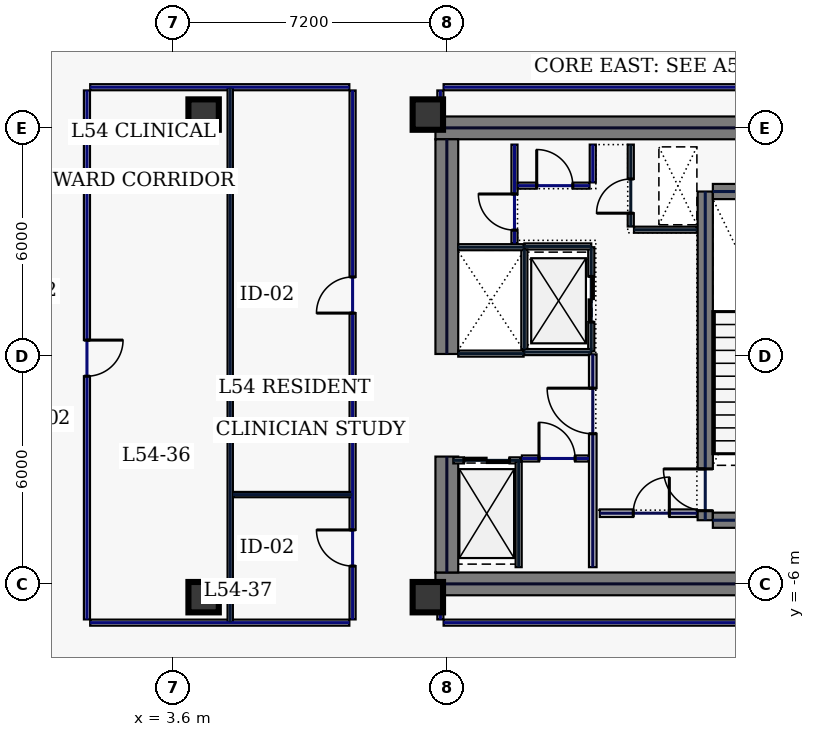
"""IFC4 building model, lengths in metres.
Left out: names, types, materials, properties, quantities, classifications, styles, units other than length and angle.
Written with IfcOpenShell. Run it as: python <this file> out.ifc"""

import sys

from ifc_helpers import new_model, si_unit, direction, frame, frame_2d, origin, origin_2d, place, context, subcontext, project, spatial, rectangle, hollow_rectangle, extrude, element, fill, save


model = new_model("IFC4")
c1 = context("Model", 3, precision=1e-05, world=origin(), true_north=direction((0.0, 1.0)))
c2 = subcontext(c1, "Body", "Model", "MODEL_VIEW")
j1 = project(units=[si_unit("LENGTHUNIT", "METRE"), si_unit("PLANEANGLEUNIT", "RADIAN")], contexts=[c1])
p1 = place(None, origin())
s1 = spatial("IfcSite", under=j1, at=p1, CompositionType="ELEMENT")
p2 = place(p1, origin())
s2 = spatial("IfcBuilding", under=s1, at=p2, CompositionType="ELEMENT")
p3 = place(p2, frame((0.0, 0.0, 234.2)))
s3 = spatial("IfcBuildingStorey", under=s2, at=p3, CompositionType="ELEMENT", Elevation=234.2)
for number, where, z_axis, x_axis in (
    (1, (10.5, 6.0, 0.0), (0.0, 0.0, 1.0), (1.0, 0.0, 0.0)),
    (2, (10.5, -6.0, 0.0), (0.0, 0.0, 1.0), (1.0, 0.0, 0.0)),
):
    element("IfcWall", number, at=place(p3, frame(where, z_axis=z_axis, x_axis=x_axis)), inside=s3, PredefinedType="SHEAR", context=c2, shape_type="SweptSolid", body=[
        extrude(rectangle(XDim=11.5, YDim=0.6, at=frame_2d((5.75, 0.0))), origin(), (0.0, 0.0, 1.0), 3.74),
    ])
p4 = place(p3, frame((10.8, -5.7, 0.0), z_axis=(0.0, 0.0, 1.0), x_axis=(0.0, 1.0, 0.0)))
e3 = element("IfcWall", 3, at=p4, inside=s3, PredefinedType="SHEAR", context=c2, shape_type="SweptSolid", body=[
    extrude(rectangle(XDim=3.05, YDim=0.6, at=frame_2d((1.525, 0.0))), origin(), (0.0, 0.0, 1.0), 3.74),
])
p5 = place(p3, frame((10.8, 0.05, 0.0), z_axis=(0.0, 0.0, 1.0), x_axis=(0.0, 1.0, 0.0)))
e4 = element("IfcWall", 4, at=p5, inside=s3, PredefinedType="SHEAR", context=c2, shape_type="SweptSolid", body=[
    extrude(rectangle(XDim=5.65, YDim=0.6, at=frame_2d((2.825, 0.0))), origin(), (0.0, 0.0, 1.0), 3.74),
])
p6 = place(p3, frame((17.6, -4.325, 0.0), z_axis=(0.0, 0.0, 1.0), x_axis=(0.0, 1.0, 0.0)))
e5 = element("IfcWall", 5, at=p6, inside=s3, PredefinedType="SHEAR", context=c2, shape_type="SweptSolid", body=[
    extrude(rectangle(XDim=8.65, YDim=0.4, at=frame_2d((4.325, 0.0))), origin(), (0.0, 0.0, 1.0), 3.74),
])
p7 = place(p6, frame((0.25, 0.0, 0.0)))
e6 = element("IfcOpeningElement", 6, at=p7, cuts=e5, PredefinedType="OPENING", context=c2, shape_type="SweptSolid", body=[
    extrude(rectangle(XDim=1.1, YDim=2.2, at=frame_2d((0.55, 1.1))), frame((0.0, 0.21, 0.0), z_axis=(0.0, -1.0, 0.0), x_axis=(1.0, 0.0, 0.0)), (0.0, 0.0, 1.0), 0.42),
])
for number, where, z_axis, x_axis in (
    (7, (17.8, -4.325, 0.0), (0.0, 0.0, 1.0), (1.0, 0.0, 0.0)),
    (8, (17.8, 4.325, 0.0), (0.0, 0.0, 1.0), (1.0, 0.0, 0.0)),
):
    element("IfcWall", number, at=place(p3, frame(where, z_axis=z_axis, x_axis=x_axis)), inside=s3, PredefinedType="SHEAR", context=c2, shape_type="SweptSolid", body=[
        extrude(rectangle(XDim=3.4, YDim=0.4, at=frame_2d((1.7, 0.0))), origin(), (0.0, 0.0, 1.0), 3.74),
    ])
for number, where, z_axis, x_axis in (
    (9, (10.3, -6.35, 0.0), (0.0, 0.0, 1.0), (1.0, 0.0, 0.0)),
    (10, (10.3, 6.35, 0.0), (0.0, 0.0, 1.0), (1.0, 0.0, 0.0)),
    (11, (4.4, -6.35, 0.0), (0.0, 0.0, 1.0), (1.0, 0.0, 0.0)),
    (12, (4.4, 6.35, 0.0), (0.0, 0.0, 1.0), (1.0, 0.0, 0.0)),
):
    element("IfcColumn", number, at=place(p3, frame(where, z_axis=z_axis, x_axis=x_axis)), inside=s3, PredefinedType="COLUMN", context=c2, shape_type="SweptSolid", body=[
        extrude(hollow_rectangle(XDim=0.8, YDim=0.8, WallThickness=0.036, at=origin_2d()), origin(), (0.0, 0.0, 1.0), 3.74),
    ])
p8 = place(p3, frame((14.6, 0.12, 0.0), z_axis=(0.0, 0.0, 1.0), x_axis=(0.0, 1.0, 0.0)))
e13 = element("IfcWall", 13, at=p8, inside=s3, PredefinedType="PARTITIONING", context=c2, shape_type="SweptSolid", body=[
    extrude(rectangle(XDim=2.74, YDim=0.16, at=frame_2d((1.37, 0.0))), origin(), (0.0, 0.0, 1.0), 3.74),
])
p9 = place(p8, frame((0.77, 0.0, 0.0)))
e14 = element("IfcOpeningElement", 14, at=p9, cuts=e13, PredefinedType="OPENING", context=c2, shape_type="SweptSolid", body=[
    extrude(rectangle(XDim=1.2, YDim=2.2, at=frame_2d((0.6, 1.1))), frame((0.0, 0.09, 0.0), z_axis=(0.0, -1.0, 0.0), x_axis=(1.0, 0.0, 0.0)), (0.0, 0.0, 1.0), 0.18),
])
for number, where, z_axis, x_axis in (
    (15, (12.84, 0.1, 0.0), (0.0, 0.0, 1.0), (1.0, 0.0, 0.0)),
    (16, (12.84, 2.88, 0.0), (0.0, 0.0, 1.0), (1.0, 0.0, 0.0)),
):
    element("IfcWall", number, at=place(p3, frame(where, z_axis=z_axis, x_axis=x_axis)), inside=s3, PredefinedType="PARTITIONING", context=c2, shape_type="SweptSolid", body=[
        extrude(rectangle(XDim=1.76, YDim=0.16, at=frame_2d((0.88, 0.0))), origin(), (0.0, 0.0, 1.0), 3.74),
    ])
p10 = place(p3, frame((12.84, 0.18, 0.0), z_axis=(0.0, 0.0, 1.0), x_axis=(0.0, 1.0, 0.0)))
e17 = element("IfcWall", 17, at=p10, inside=s3, PredefinedType="PARTITIONING", context=c2, shape_type="SweptSolid", body=[
    extrude(rectangle(XDim=2.62, YDim=0.16, at=frame_2d((1.31, 0.0))), origin(), (0.0, 0.0, 1.0), 3.74),
])
p11 = place(p3, frame((10.97, -2.75, 0.0), z_axis=(0.0, 0.0, 1.0), x_axis=(1.0, 0.0, 0.0)))
e18 = element("IfcWall", 18, at=p11, inside=s3, PredefinedType="PARTITIONING", context=c2, shape_type="SweptSolid", body=[
    extrude(rectangle(XDim=1.76, YDim=0.16, at=frame_2d((0.88, 0.0))), origin(), (0.0, 0.0, 1.0), 3.74),
])
p12 = place(p11, frame((0.28, 0.0, 0.0)))
e19 = element("IfcOpeningElement", 19, at=p12, cuts=e18, PredefinedType="OPENING", context=c2, shape_type="SweptSolid", body=[
    extrude(rectangle(XDim=1.2, YDim=2.2, at=frame_2d((0.6, 1.1))), frame((0.0, 0.09, 0.0), z_axis=(0.0, -1.0, 0.0), x_axis=(1.0, 0.0, 0.0)), (0.0, 0.0, 1.0), 0.18),
])
for number, where, z_axis, x_axis in (
    (20, (11.1, 0.06, 0.0), (0.0, 0.0, 1.0), (1.0, 0.0, 0.0)),
    (21, (11.1, 2.86, 0.0), (0.0, 0.0, 1.0), (1.0, 0.0, 0.0)),
):
    element("IfcWall", number, at=place(p3, frame(where, z_axis=z_axis, x_axis=x_axis)), inside=s3, PredefinedType="PARTITIONING", context=c2, shape_type="SweptSolid", body=[
        extrude(rectangle(XDim=1.72, YDim=0.16, at=frame_2d((0.86, 0.0))), origin(), (0.0, 0.0, 1.0), 3.74),
    ])
p13 = place(p3, frame((15.64, 3.405, 0.0), z_axis=(0.0, 0.0, 1.0), x_axis=(0.0, 1.0, 0.0)))
e22 = element("IfcWall", 22, at=p13, inside=s3, PredefinedType="PARTITIONING", context=c2, shape_type="SweptSolid", body=[
    extrude(rectangle(XDim=2.155, YDim=0.16, at=frame_2d((1.078, 0.0))), origin(), (0.0, 0.0, 1.0), 3.74),
])
p14 = place(p13, frame((0.35, 0.0, 0.0)))
e23 = element("IfcOpeningElement", 23, at=p14, cuts=e22, PredefinedType="OPENING", context=c2, shape_type="SweptSolid", body=[
    extrude(rectangle(XDim=0.9, YDim=2.2, at=frame_2d((0.45, 1.1))), frame((0.0, 0.09, 0.0), z_axis=(0.0, -1.0, 0.0), x_axis=(1.0, 0.0, 0.0)), (0.0, 0.0, 1.0), 0.18),
])
p15 = place(p3, frame((15.725, 3.32, 0.0), z_axis=(0.0, 0.0, 1.0), x_axis=(1.0, 0.0, 0.0)))
e24 = element("IfcWall", 24, at=p15, inside=s3, PredefinedType="PARTITIONING", context=c2, shape_type="SweptSolid", body=[
    extrude(rectangle(XDim=1.655, YDim=0.16, at=frame_2d((0.827, 0.0))), origin(), (0.0, 0.0, 1.0), 3.74),
])
p16 = place(p3, frame((14.825, -4.14, 0.0), z_axis=(0.0, 0.0, 1.0), x_axis=(1.0, 0.0, 0.0)))
e25 = element("IfcWall", 25, at=p16, inside=s3, PredefinedType="SOLIDWALL", context=c2, shape_type="SweptSolid", body=[
    extrude(rectangle(XDim=2.555, YDim=0.2, at=frame_2d((1.277, 0.0))), origin(), (0.0, 0.0, 1.0), 3.74),
])
p17 = place(p16, frame((0.88, 0.0, 0.0)))
e26 = element("IfcOpeningElement", 26, at=p17, cuts=e25, PredefinedType="OPENING", context=c2, shape_type="SweptSolid", body=[
    extrude(rectangle(XDim=0.95, YDim=2.2, at=frame_2d((0.475, 1.1))), frame((0.0, 0.11, 0.0), z_axis=(0.0, -1.0, 0.0), x_axis=(1.0, 0.0, 0.0)), (0.0, 0.0, 1.0), 0.22),
])
p18 = place(p3, frame((12.775, -2.7, 0.0), z_axis=(0.0, 0.0, 1.0), x_axis=(1.0, 0.0, 0.0)))
e27 = element("IfcWall", 27, at=p18, inside=s3, PredefinedType="PARTITIONING", context=c2, shape_type="SweptSolid", body=[
    extrude(rectangle(XDim=1.76, YDim=0.16, at=frame_2d((0.88, 0.0))), origin(), (0.0, 0.0, 1.0), 3.74),
])
p19 = place(p18, frame((0.45, 0.0, 0.0)))
e28 = element("IfcOpeningElement", 28, at=p19, cuts=e27, PredefinedType="OPENING", context=c2, shape_type="SweptSolid", body=[
    extrude(rectangle(XDim=0.95, YDim=2.2, at=frame_2d((0.475, 1.1))), frame((0.0, 0.09, 0.0), z_axis=(0.0, -1.0, 0.0), x_axis=(1.0, 0.0, 0.0)), (0.0, 0.0, 1.0), 0.18),
])
p20 = place(p3, frame((12.69, -5.56, 0.0), z_axis=(0.0, 0.0, 1.0), x_axis=(0.0, 1.0, 0.0)))
e29 = element("IfcWall", 29, at=p20, inside=s3, PredefinedType="PARTITIONING", context=c2, shape_type="SweptSolid", body=[
    extrude(rectangle(XDim=2.775, YDim=0.16, at=frame_2d((1.388, 0.0))), origin(), (0.0, 0.0, 1.0), 3.74),
])
p21 = place(p3, frame((12.58, 2.96, 0.0), z_axis=(0.0, 0.0, 1.0), x_axis=(0.0, 1.0, 0.0)))
e30 = element("IfcWall", 30, at=p21, inside=s3, PredefinedType="PARTITIONING", context=c2, shape_type="SweptSolid", body=[
    extrude(rectangle(XDim=2.6, YDim=0.16, at=frame_2d((1.3, 0.0))), origin(), (0.0, 0.0, 1.0), 3.74),
])
p22 = place(p21, frame((0.35, 0.0, 0.0)))
e31 = element("IfcOpeningElement", 31, at=p22, cuts=e30, PredefinedType="OPENING", context=c2, shape_type="SweptSolid", body=[
    extrude(rectangle(XDim=0.95, YDim=2.2, at=frame_2d((0.475, 1.1))), frame((0.0, 0.09, 0.0), z_axis=(0.0, -1.0, 0.0), x_axis=(1.0, 0.0, 0.0)), (0.0, 0.0, 1.0), 0.18),
])
p23 = place(p3, frame((12.665, 4.48, 0.0), z_axis=(0.0, 0.0, 1.0), x_axis=(1.0, 0.0, 0.0)))
e32 = element("IfcWall", 32, at=p23, inside=s3, PredefinedType="PARTITIONING", context=c2, shape_type="SweptSolid", body=[
    extrude(rectangle(XDim=1.89, YDim=0.16, at=frame_2d((0.945, 0.0))), origin(), (0.0, 0.0, 1.0), 3.74),
])
p24 = place(p23, frame((0.5, 0.0, 0.0)))
e33 = element("IfcOpeningElement", 33, at=p24, cuts=e32, PredefinedType="OPENING", context=c2, shape_type="SweptSolid", body=[
    extrude(rectangle(XDim=0.95, YDim=2.2, at=frame_2d((0.475, 1.1))), frame((0.0, 0.09, 0.0), z_axis=(0.0, -1.0, 0.0), x_axis=(1.0, 0.0, 0.0)), (0.0, 0.0, 1.0), 0.18),
])
p25 = place(p3, frame((14.64, 4.565, 0.0), z_axis=(0.0, 0.0, 1.0), x_axis=(0.0, 1.0, 0.0)))
e34 = element("IfcWall", 34, at=p25, inside=s3, PredefinedType="PARTITIONING", context=c2, shape_type="SweptSolid", body=[
    extrude(rectangle(XDim=0.995, YDim=0.16, at=frame_2d((0.498, 0.0))), origin(), (0.0, 0.0, 1.0), 3.74),
])
p26 = place(p3, frame((14.64, -5.56, 0.0), z_axis=(0.0, 0.0, 1.0), x_axis=(0.0, 1.0, 0.0)))
e35 = element("IfcWall", 35, at=p26, inside=s3, PredefinedType="SOLIDWALL", context=c2, shape_type="SweptSolid", body=[
    extrude(rectangle(XDim=5.6, YDim=0.2, at=frame_2d((2.8, 0.0))), origin(), (0.0, 0.0, 1.0), 3.74),
])
p27 = place(p26, frame((3.51, 0.0, 0.0)))
e36 = element("IfcOpeningElement", 36, at=p27, cuts=e35, PredefinedType="OPENING", context=c2, shape_type="SweptSolid", body=[
    extrude(rectangle(XDim=1.2, YDim=2.2, at=frame_2d((0.6, 1.1))), frame((0.0, 0.11, 0.0), z_axis=(0.0, -1.0, 0.0), x_axis=(1.0, 0.0, 0.0)), (0.0, 0.0, 1.0), 0.22),
])
p28 = place(p3, frame((24.815, 7.07, 0.0), z_axis=(0.0, 0.0, 1.0), x_axis=(-1.0, 0.0, 0.0)))
e37 = element("IfcWall", 37, at=p28, inside=s3, PredefinedType="PARTITIONING", context=c2, shape_type="SweptSolid", body=[
    extrude(rectangle(XDim=14.1, YDim=0.16, at=frame_2d((7.05, 0.0))), origin(), (0.0, 0.0, 1.0), 3.74),
])
p29 = place(p3, frame((10.63, 6.985, 0.0), z_axis=(0.0, 0.0, 1.0), x_axis=(0.0, -1.0, 0.0)))
e38 = element("IfcWall", 38, at=p29, inside=s3, PredefinedType="PARTITIONING", context=c2, shape_type="SweptSolid", body=[
    extrude(rectangle(XDim=0.565, YDim=0.16, at=frame_2d((0.283, 0.0))), origin(), (0.0, 0.0, 1.0), 3.74),
])
p30 = place(p3, frame((10.63, -6.42, 0.0), z_axis=(0.0, 0.0, 1.0), x_axis=(0.0, -1.0, 0.0)))
e39 = element("IfcWall", 39, at=p30, inside=s3, PredefinedType="PARTITIONING", context=c2, shape_type="SweptSolid", body=[
    extrude(rectangle(XDim=0.515, YDim=0.16, at=frame_2d((0.258, 0.0))), origin(), (0.0, 0.0, 1.0), 3.74),
])
p31 = place(p3, frame((10.715, -7.02, 0.0), z_axis=(0.0, 0.0, 1.0), x_axis=(1.0, 0.0, 0.0)))
e40 = element("IfcWall", 40, at=p31, inside=s3, PredefinedType="PARTITIONING", context=c2, shape_type="SweptSolid", body=[
    extrude(rectangle(XDim=14.1, YDim=0.16, at=frame_2d((7.05, 0.0))), origin(), (0.0, 0.0, 1.0), 3.74),
])
p32 = place(p3, frame((8.235, 7.07, 0.0), z_axis=(0.0, 0.0, 1.0), x_axis=(-1.0, 0.0, 0.0)))
e41 = element("IfcWall", 41, at=p32, inside=s3, PredefinedType="PARTITIONING", context=c2, shape_type="SweptSolid", body=[
    extrude(rectangle(XDim=6.82, YDim=0.16, at=frame_2d((3.41, 0.0))), origin(), (0.0, 0.0, 1.0), 3.74),
])
p33 = place(p3, frame((1.33, 6.985, 0.0), z_axis=(0.0, 0.0, 1.0), x_axis=(0.0, -1.0, 0.0)))
e42 = element("IfcWall", 42, at=p33, inside=s3, PredefinedType="PARTITIONING", context=c2, shape_type="SweptSolid", body=[
    extrude(rectangle(XDim=13.92, YDim=0.16, at=frame_2d((6.96, 0.0))), origin(), (0.0, 0.0, 1.0), 3.74),
])
p34 = place(p33, frame((6.57, 0.0, 0.0)))
e43 = element("IfcOpeningElement", 43, at=p34, cuts=e42, PredefinedType="OPENING", context=c2, shape_type="SweptSolid", body=[
    extrude(rectangle(XDim=0.95, YDim=2.2, at=frame_2d((0.475, 1.1))), frame((0.0, 0.09, 0.0), z_axis=(0.0, -1.0, 0.0), x_axis=(1.0, 0.0, 0.0)), (0.0, 0.0, 1.0), 0.18),
])
p35 = place(p3, frame((1.415, -7.02, 0.0), z_axis=(0.0, 0.0, 1.0), x_axis=(1.0, 0.0, 0.0)))
e44 = element("IfcWall", 44, at=p35, inside=s3, PredefinedType="PARTITIONING", context=c2, shape_type="SweptSolid", body=[
    extrude(rectangle(XDim=6.82, YDim=0.16, at=frame_2d((3.41, 0.0))), origin(), (0.0, 0.0, 1.0), 3.74),
])
p36 = place(p3, frame((8.32, -6.935, 0.0), z_axis=(0.0, 0.0, 1.0), x_axis=(0.0, 1.0, 0.0)))
e45 = element("IfcWall", 45, at=p36, inside=s3, PredefinedType="PARTITIONING", context=c2, shape_type="SweptSolid", body=[
    extrude(rectangle(XDim=13.92, YDim=0.16, at=frame_2d((6.96, 0.0))), origin(), (0.0, 0.0, 1.0), 3.74),
])
p37 = place(p36, frame((1.404, 0.0, 0.0)))
e46 = element("IfcOpeningElement", 46, at=p37, cuts=e45, PredefinedType="OPENING", context=c2, shape_type="SweptSolid", body=[
    extrude(rectangle(XDim=0.95, YDim=2.2, at=frame_2d((0.475, 1.1))), frame((0.0, 0.09, 0.0), z_axis=(0.0, -1.0, 0.0), x_axis=(1.0, 0.0, 0.0)), (0.0, 0.0, 1.0), 0.18),
])
p38 = place(p36, frame((8.061, 0.0, 0.0)))
e47 = element("IfcOpeningElement", 47, at=p38, cuts=e45, PredefinedType="OPENING", context=c2, shape_type="SweptSolid", body=[
    extrude(rectangle(XDim=0.95, YDim=2.2, at=frame_2d((0.475, 1.1))), frame((0.0, 0.09, 0.0), z_axis=(0.0, -1.0, 0.0), x_axis=(1.0, 0.0, 0.0)), (0.0, 0.0, 1.0), 0.18),
])
p39 = place(p3, frame((5.1, -7.015, 0.0), z_axis=(0.0, 0.0, 1.0), x_axis=(0.0, 1.0, 0.0)))
e48 = element("IfcWall", 48, at=p39, inside=s3, PredefinedType="PARTITIONING", context=c2, shape_type="SweptSolid", body=[
    extrude(rectangle(XDim=14.08, YDim=0.14, at=frame_2d((7.04, 0.0))), origin(), (0.0, 0.0, 1.0), 3.74),
])
p40 = place(p3, frame((5.175, -3.65, 0.0), z_axis=(0.0, 0.0, 1.0), x_axis=(1.0, 0.0, 0.0)))
e49 = element("IfcWall", 49, at=p40, inside=s3, PredefinedType="PARTITIONING", context=c2, shape_type="SweptSolid", body=[
    extrude(rectangle(XDim=3.14, YDim=0.14, at=frame_2d((1.57, 0.0))), origin(), (0.0, 0.0, 1.0), 3.74),
])
p41 = place(p7, origin())
e50 = element("IfcDoor", 50, at=p41, inside=s3, OperationType="SINGLE_SWING_RIGHT", PredefinedType="DOOR", context=c2, shape_type="SweptSolid", body=[
    extrude(rectangle(XDim=1.1, YDim=2.2, at=frame_2d((0.55, 1.1))), frame((0.0, 0.025, 0.0), z_axis=(0.0, -1.0, 0.0), x_axis=(1.0, 0.0, 0.0)), (0.0, 0.0, 1.0), 0.05),
])
fill(e6, e50)
p42 = place(p9, origin())
e51 = element("IfcDoor", 51, at=p42, inside=s3, OperationType="SLIDING_TO_LEFT", PredefinedType="DOOR", context=c2, shape_type="SweptSolid", body=[
    extrude(rectangle(XDim=1.2, YDim=2.2, at=frame_2d((0.6, 1.1))), frame((0.0, 0.025, 0.0), z_axis=(0.0, -1.0, 0.0), x_axis=(1.0, 0.0, 0.0)), (0.0, 0.0, 1.0), 0.05),
])
fill(e14, e51)
p43 = place(p12, origin())
e52 = element("IfcDoor", 52, at=p43, inside=s3, OperationType="SLIDING_TO_LEFT", PredefinedType="DOOR", context=c2, shape_type="SweptSolid", body=[
    extrude(rectangle(XDim=1.2, YDim=2.2, at=frame_2d((0.6, 1.1))), frame((0.0, 0.025, 0.0), z_axis=(0.0, -1.0, 0.0), x_axis=(1.0, 0.0, 0.0)), (0.0, 0.0, 1.0), 0.05),
])
fill(e19, e52)
p44 = place(p14, origin())
e53 = element("IfcDoor", 53, at=p44, inside=s3, OperationType="SINGLE_SWING_LEFT", PredefinedType="DOOR", context=c2, shape_type="SweptSolid", body=[
    extrude(rectangle(XDim=0.9, YDim=2.2, at=frame_2d((0.45, 1.1))), frame((0.0, 0.025, 0.0), z_axis=(0.0, -1.0, 0.0), x_axis=(1.0, 0.0, 0.0)), (0.0, 0.0, 1.0), 0.05),
])
fill(e23, e53)
p45 = place(p17, origin())
e54 = element("IfcDoor", 54, at=p45, inside=s3, OperationType="SINGLE_SWING_RIGHT", PredefinedType="DOOR", context=c2, shape_type="SweptSolid", body=[
    extrude(rectangle(XDim=0.95, YDim=2.2, at=frame_2d((0.475, 1.1))), frame((0.0, 0.025, 0.0), z_axis=(0.0, -1.0, 0.0), x_axis=(1.0, 0.0, 0.0)), (0.0, 0.0, 1.0), 0.05),
])
fill(e26, e54)
p46 = place(p19, origin())
e55 = element("IfcDoor", 55, at=p46, inside=s3, OperationType="SINGLE_SWING_LEFT", PredefinedType="DOOR", context=c2, shape_type="SweptSolid", body=[
    extrude(rectangle(XDim=0.95, YDim=2.2, at=frame_2d((0.475, 1.1))), frame((0.0, 0.025, 0.0), z_axis=(0.0, -1.0, 0.0), x_axis=(1.0, 0.0, 0.0)), (0.0, 0.0, 1.0), 0.05),
])
fill(e28, e55)
p47 = place(p22, origin())
e56 = element("IfcDoor", 56, at=p47, inside=s3, OperationType="SINGLE_SWING_RIGHT", PredefinedType="DOOR", context=c2, shape_type="SweptSolid", body=[
    extrude(rectangle(XDim=0.95, YDim=2.2, at=frame_2d((0.475, 1.1))), frame((0.0, 0.025, 0.0), z_axis=(0.0, -1.0, 0.0), x_axis=(1.0, 0.0, 0.0)), (0.0, 0.0, 1.0), 0.05),
])
fill(e31, e56)
p48 = place(p24, origin())
e57 = element("IfcDoor", 57, at=p48, inside=s3, OperationType="SINGLE_SWING_LEFT", PredefinedType="DOOR", context=c2, shape_type="SweptSolid", body=[
    extrude(rectangle(XDim=0.95, YDim=2.2, at=frame_2d((0.475, 1.1))), frame((0.0, 0.025, 0.0), z_axis=(0.0, -1.0, 0.0), x_axis=(1.0, 0.0, 0.0)), (0.0, 0.0, 1.0), 0.05),
])
fill(e33, e57)
p49 = place(p27, origin())
e58 = element("IfcDoor", 58, at=p49, inside=s3, OperationType="SINGLE_SWING_RIGHT", PredefinedType="DOOR", context=c2, shape_type="SweptSolid", body=[
    extrude(rectangle(XDim=1.2, YDim=2.2, at=frame_2d((0.6, 1.1))), frame((0.0, 0.025, 0.0), z_axis=(0.0, -1.0, 0.0), x_axis=(1.0, 0.0, 0.0)), (0.0, 0.0, 1.0), 0.05),
])
fill(e36, e58)
p50 = place(p34, origin())
e59 = element("IfcDoor", 59, at=p50, inside=s3, OperationType="SINGLE_SWING_LEFT", PredefinedType="DOOR", context=c2, shape_type="SweptSolid", body=[
    extrude(rectangle(XDim=0.95, YDim=2.2, at=frame_2d((0.475, 1.1))), frame((0.0, 0.025, 0.0), z_axis=(0.0, -1.0, 0.0), x_axis=(1.0, 0.0, 0.0)), (0.0, 0.0, 1.0), 0.05),
])
fill(e43, e59)
p51 = place(p37, origin())
e60 = element("IfcDoor", 60, at=p51, inside=s3, OperationType="SINGLE_SWING_RIGHT", PredefinedType="DOOR", context=c2, shape_type="SweptSolid", body=[
    extrude(rectangle(XDim=0.95, YDim=2.2, at=frame_2d((0.475, 1.1))), frame((0.0, 0.025, 0.0), z_axis=(0.0, -1.0, 0.0), x_axis=(1.0, 0.0, 0.0)), (0.0, 0.0, 1.0), 0.05),
])
fill(e46, e60)
p52 = place(p38, origin())
e61 = element("IfcDoor", 61, at=p52, inside=s3, OperationType="SINGLE_SWING_LEFT", PredefinedType="DOOR", context=c2, shape_type="SweptSolid", body=[
    extrude(rectangle(XDim=0.95, YDim=2.2, at=frame_2d((0.475, 1.1))), frame((0.0, 0.025, 0.0), z_axis=(0.0, -1.0, 0.0), x_axis=(1.0, 0.0, 0.0)), (0.0, 0.0, 1.0), 0.05),
])
fill(e47, e61)
save(model, sys.argv[1])
